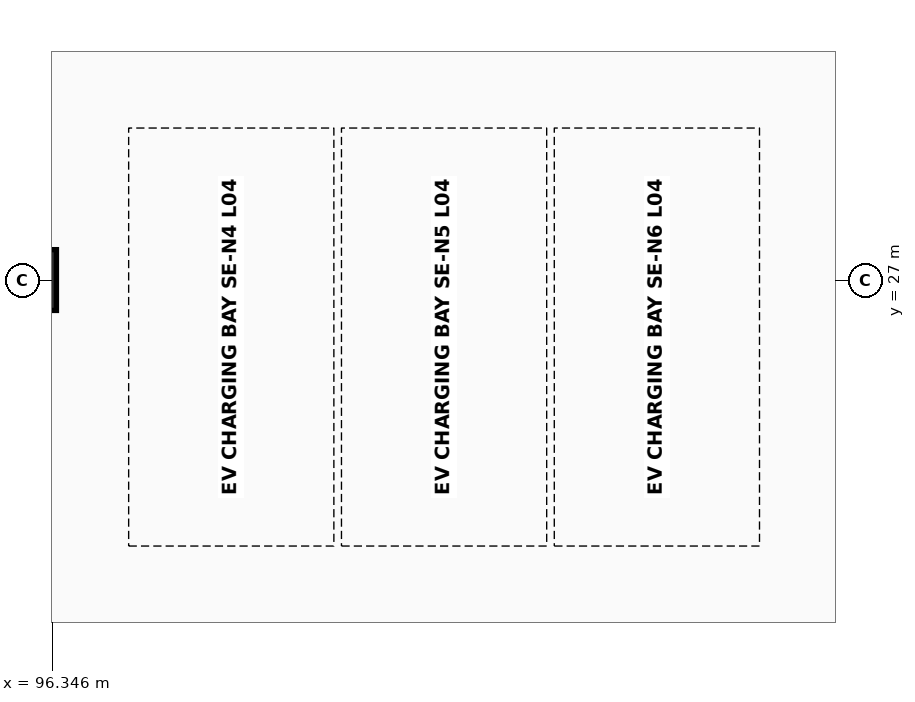
"""IFC4 building model, lengths in metres.
Left out: names, types, materials, properties, quantities, classifications, styles, units other than length and angle.
Written with IfcOpenShell. Run it as: python <this file> out.ifc"""

import sys

from ifc_helpers import new_model, si_unit, direction, frame, origin, origin_2d, place, context, subcontext, project, spatial, rectangle, extrude, element, save


model = new_model("IFC4")
c1 = context("Model", 3, precision=1e-05, world=origin(), true_north=direction((0.0, 1.0)))
c2 = subcontext(c1, "Body", "Model", "MODEL_VIEW")
j1 = project(units=[si_unit("LENGTHUNIT", "METRE"), si_unit("PLANEANGLEUNIT", "RADIAN")], contexts=[c1])
p1 = place(None, origin())
s1 = spatial("IfcSite", under=j1, at=p1, CompositionType="ELEMENT")
p2 = place(p1, origin())
s2 = spatial("IfcBuilding", under=s1, at=p2, CompositionType="ELEMENT")
p3 = place(p2, frame((0.0, 0.0, 17.2)))
s3 = spatial("IfcBuildingStorey", under=s2, at=p3, CompositionType="ELEMENT", Elevation=17.2)
p4 = place(p3, frame((96.0, 27.0, 0.0), z_axis=(0.0, 0.0, 1.0), x_axis=(1.0, 0.0, 0.0)))
e1 = element("IfcColumn", 1, at=p4, inside=s3, PredefinedType="COLUMN", context=c2, shape_type="SweptSolid", body=[
    extrude(rectangle(XDim=0.8, YDim=0.8, at=origin_2d()), origin(), (0.0, 0.0, 1.0), 3.8),
])
save(model, sys.argv[1])
